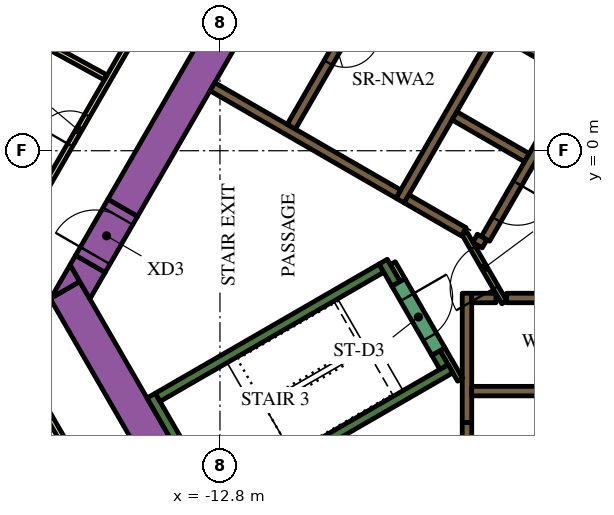
"""IFC4 building model, lengths in metres.
Left out: names, types, materials, properties, quantities, classifications, styles, units other than length and angle.
Written with IfcOpenShell. Run it as: python <this file> out.ifc"""

import sys

from ifc_helpers import new_model, si_unit, direction, frame, frame_2d, origin, place, context, subcontext, project, spatial, polyline, rectangle, outline, extrude, element, fill, save


model = new_model("IFC4")
c1 = context("Model", 3, precision=1e-05, world=origin(), true_north=direction((0.0, 1.0)))
c2 = subcontext(c1, "Body", "Model", "MODEL_VIEW")
j1 = project(units=[si_unit("LENGTHUNIT", "METRE"), si_unit("PLANEANGLEUNIT", "RADIAN")], contexts=[c1])
p1 = place(None, origin())
s1 = spatial("IfcSite", under=j1, at=p1, CompositionType="ELEMENT")
p2 = place(p1, origin())
s2 = spatial("IfcBuilding", under=s1, at=p2, CompositionType="ELEMENT")
p3 = place(p2, frame((0.0, 0.0, 118.8)))
s3 = spatial("IfcBuildingStorey", under=s2, at=p3, CompositionType="ELEMENT", Elevation=118.8)
p4 = place(p3, frame((-15.36, -1.503, 0.0), z_axis=(0.0, 0.0, 1.0), x_axis=(0.50000389221, 0.866023156604, 0.0)))
e1 = element("IfcWall", 1, at=p4, inside=s3, PredefinedType="SOLIDWALL", context=c2, shape_type="SweptSolid", body=[
    extrude(rectangle(XDim=21.0, YDim=0.9, at=frame_2d((10.5, 0.0))), origin(), (0.0, 0.0, 1.0), 3.9),
])
p5 = place(p3, frame((-12.134, -11.883, 0.0), z_axis=(0.0, 0.0, 1.0), x_axis=(-0.500005339912, 0.866022320763, 0.0)))
e2 = element("IfcWall", 2, at=p5, inside=s3, PredefinedType="SOLIDWALL", context=c2, shape_type="SweptSolid", body=[
    extrude(rectangle(XDim=9.488, YDim=0.9, at=frame_2d((4.744, 0.0))), origin(), (0.0, 0.0, 1.0), 3.9),
])
p6 = place(p3, origin())
e3 = element("IfcWall", 3, at=p6, inside=s3, PredefinedType="SOLIDWALL", context=c2, shape_type="SweptSolid", body=[
    extrude(outline(polyline([(-16.489, -3.44), (-17.251, -3.88), (-16.743, -3.0), (-16.489, -3.44)])), origin(), (0.0, 0.0, 1.0), 3.9),
])
e4 = element("IfcWall", 4, at=p6, inside=s3, PredefinedType="SOLIDWALL", context=c2, shape_type="SweptSolid", body=[
    extrude(outline(polyline([(-15.82, -3.201), (-16.223, -3.9), (-16.743, -3.0), (-16.599, -2.751), (-15.82, -3.201)])), origin(), (0.0, 0.0, 1.0), 3.9),
])
p7 = place(p3, frame((-12.885, -9.431, 0.0), z_axis=(0.0, 0.0, 1.0), x_axis=(-0.500020560727, 0.866013532718, 0.0)))
e5 = element("IfcWall", 5, at=p7, inside=s3, PredefinedType="SOLIDWALL", context=c2, shape_type="SweptSolid", body=[
    extrude(rectangle(XDim=3.45, YDim=0.25, at=frame_2d((1.725, 0.0))), origin(), (0.0, 0.0, 1.0), 3.9),
])
p8 = place(p3, frame((-14.44, -6.49, 0.0), z_axis=(0.0, 0.0, 1.0), x_axis=(0.866022966069, 0.500004222222, 0.0)))
e6 = element("IfcWall", 6, at=p8, inside=s3, PredefinedType="SOLIDWALL", context=c2, shape_type="SweptSolid", body=[
    extrude(rectangle(XDim=6.8, YDim=0.25, at=frame_2d((3.4, 0.0))), origin(), (0.0, 0.0, 1.0), 3.9),
])
p9 = place(p3, frame((-8.168, -3.503, 0.0), z_axis=(0.0, 0.0, 1.0), x_axis=(-0.499952099219, 0.866053057547, 0.0)))
e7 = element("IfcWall", 7, at=p9, inside=s3, PredefinedType="SOLIDWALL", context=c2, shape_type="SweptSolid", body=[
    extrude(rectangle(XDim=0.675, YDim=0.25, at=frame_2d((0.337, 0.0))), origin(), (0.0, 0.0, 1.0), 3.9),
])
p10 = place(p3, frame((-12.84, -9.261, 0.0), z_axis=(0.0, 0.0, 1.0), x_axis=(0.866016039709, 0.500016218704, 0.0)))
e8 = element("IfcWall", 8, at=p10, inside=s3, PredefinedType="SOLIDWALL", context=c2, shape_type="SweptSolid", body=[
    extrude(rectangle(XDim=7.05, YDim=0.25, at=frame_2d((3.525, 0.0))), origin(), (0.0, 0.0, 1.0), 3.9),
])
p11 = place(p3, frame((-6.905, -5.69, 0.0), z_axis=(0.0, 0.0, 1.0), x_axis=(-0.500402024738, 0.865793170242, 0.0)))
e9 = element("IfcWall", 9, at=p11, inside=s3, PredefinedType="SOLIDWALL", context=c2, shape_type="SweptSolid", body=[
    extrude(rectangle(XDim=0.425, YDim=0.25, at=frame_2d((0.212, 0.0))), origin(), (0.0, 0.0, 1.0), 3.9),
])
p12 = place(p3, frame((-5.259, -3.875, 0.0), z_axis=(0.0, 0.0, 1.0), x_axis=(1.0, 0.0, 0.0)))
e10 = element("IfcWall", 10, at=p12, inside=s3, PredefinedType="SOLIDWALL", context=c2, shape_type="SweptSolid", body=[
    extrude(rectangle(XDim=10.489, YDim=0.25, at=frame_2d((5.244, 0.0))), origin(), (0.0, 0.0, 1.0), 3.9),
])
p13 = place(p3, frame((-6.3, -3.75, 0.0), z_axis=(0.0, 0.0, 1.0), x_axis=(0.0, -1.0, 0.0)))
e11 = element("IfcWall", 11, at=p13, inside=s3, PredefinedType="SOLIDWALL", context=c2, shape_type="SweptSolid", body=[
    extrude(rectangle(XDim=3.404, YDim=0.25, at=frame_2d((1.702, 0.0))), origin(), (0.0, 0.0, 1.0), 3.9),
])
p14 = place(p3, frame((-6.175, -3.875, 0.0), z_axis=(0.0, 0.0, 1.0), x_axis=(1.0, 0.0, 0.0)))
e12 = element("IfcWall", 12, at=p14, inside=s3, PredefinedType="SOLIDWALL", context=c2, shape_type="SweptSolid", body=[
    extrude(rectangle(XDim=0.637, YDim=0.25, at=frame_2d((0.318, 0.0))), origin(), (0.0, 0.0, 1.0), 3.9),
])
p15 = place(p3, frame((-8.06, -1.311, 0.0), z_axis=(0.0, 0.0, 1.0), x_axis=(0.50000273126, 0.866023826885, 0.0)))
e13 = element("IfcWall", 13, at=p15, inside=s3, PredefinedType="SOLIDWALL", context=c2, shape_type="SweptSolid", body=[
    extrude(rectangle(XDim=10.33, YDim=0.25, at=frame_2d((5.165, 0.0))), origin(), (0.0, 0.0, 1.0), 3.9),
])
for number, where, z_axis, x_axis in (
    (14, (-5.369, 3.1, 0.0), (0.0, 0.0, 1.0), (0.866, -0.5, 0.0)),
    (15, (-4.724, -0.182, 0.0), (0.0, 0.0, 1.0), (-0.866, 0.5, 0.0)),
):
    element("IfcWall", number, at=place(p3, frame(where, z_axis=z_axis, x_axis=x_axis)), inside=s3, PredefinedType="SOLIDWALL", context=c2, shape_type="SweptSolid", body=[
        extrude(rectangle(XDim=2.2, YDim=0.25, at=frame_2d((1.1, 0.0))), origin(), (0.0, 0.0, 1.0), 3.9),
    ])
p16 = place(p3, frame((-6.088, -2.305, 0.0), z_axis=(0.0, 0.0, 1.0), x_axis=(0.866059450854, -0.499941024108, 0.0)))
e16 = element("IfcWall", 16, at=p16, inside=s3, PredefinedType="SOLIDWALL", context=c2, shape_type="SweptSolid", body=[
    extrude(rectangle(XDim=0.29, YDim=0.25, at=frame_2d((0.145, 0.0))), origin(), (0.0, 0.0, 1.0), 3.9),
])
p17 = place(p3, frame((-7.889, -1.265, 0.0), z_axis=(0.0, 0.0, 1.0), x_axis=(0.865986741702, -0.500066958712, 0.0)))
e17 = element("IfcWall", 17, at=p17, inside=s3, PredefinedType="SOLIDWALL", context=c2, shape_type="SweptSolid", body=[
    extrude(rectangle(XDim=1.738, YDim=0.25, at=frame_2d((0.869, 0.0))), origin(), (0.0, 0.0, 1.0), 3.9),
])
p18 = place(p3, frame((-8.106, -1.14, 0.0), z_axis=(0.0, 0.0, 1.0), x_axis=(-0.866000643155, 0.500042884217, 0.0)))
e18 = element("IfcWall", 18, at=p18, inside=s3, PredefinedType="SOLIDWALL", context=c2, shape_type="SweptSolid", body=[
    extrude(rectangle(XDim=5.65, YDim=0.25, at=frame_2d((2.825, 0.0))), origin(), (0.0, 0.0, 1.0), 3.9),
])
p19 = place(p3, frame((-6.48, -6.027, 0.0), z_axis=(0.0, 0.0, 1.0), x_axis=(-0.499927229454, 0.866067413802, 0.0)))
e19 = element("IfcWall", 19, at=p19, inside=s3, PredefinedType="PARTITIONING", context=c2, shape_type="SweptSolid", body=[
    extrude(rectangle(XDim=0.929, YDim=0.15, at=frame_2d((0.464, 0.0))), origin(), (0.0, 0.0, 1.0), 3.9),
])
p20 = place(p3, frame((-8.252, -2.958, 0.0), z_axis=(0.0, 0.0, 1.0), x_axis=(0.500174715838, -0.865924508047, 0.0)))
e20 = element("IfcWall", 20, at=p20, inside=s3, PredefinedType="PARTITIONING", context=c2, shape_type="SweptSolid", body=[
    extrude(rectangle(XDim=0.514, YDim=0.15, at=frame_2d((0.257, 0.0))), origin(), (0.0, 0.0, 1.0), 2.75),
])
p21 = place(p3, frame((-6.175, -6.325, 0.0), z_axis=(0.0, 0.0, 1.0), x_axis=(1.0, 0.0, 0.0)))
e21 = element("IfcWall", 21, at=p21, inside=s3, PredefinedType="SOLIDWALL", context=c2, shape_type="SweptSolid", body=[
    extrude(rectangle(XDim=12.35, YDim=0.25, at=frame_2d((6.175, 0.0))), origin(), (0.0, 0.0, 1.0), 3.9),
])
p22 = place(p21, frame((3.205, 0.0, 0.0)))
e22 = element("IfcOpeningElement", 22, at=p22, cuts=e21, PredefinedType="OPENING", context=c2, shape_type="SweptSolid", body=[
    extrude(rectangle(XDim=0.9, YDim=2.1, at=frame_2d((0.45, 1.05))), frame((0.0, 0.135, 0.0), z_axis=(0.0, -1.0, 0.0), x_axis=(1.0, 0.0, 0.0)), (0.0, 0.0, 1.0), 0.27),
])
p23 = place(p21, frame((8.145, 0.0, 0.0)))
e23 = element("IfcOpeningElement", 23, at=p23, cuts=e21, PredefinedType="OPENING", context=c2, shape_type="SweptSolid", body=[
    extrude(rectangle(XDim=1.1, YDim=2.1, at=frame_2d((0.55, 1.05))), frame((0.0, 0.135, 0.0), z_axis=(0.0, -1.0, 0.0), x_axis=(1.0, 0.0, 0.0)), (0.0, 0.0, 1.0), 0.27),
])
p24 = place(p21, frame((10.665, 0.0, 0.0)))
e24 = element("IfcOpeningElement", 24, at=p24, cuts=e21, PredefinedType="OPENING", context=c2, shape_type="SweptSolid", body=[
    extrude(rectangle(XDim=1.1, YDim=2.1, at=frame_2d((0.55, 1.05))), frame((0.0, 0.135, 0.0), z_axis=(0.0, -1.0, 0.0), x_axis=(1.0, 0.0, 0.0)), (0.0, 0.0, 1.0), 0.27),
])
p25 = place(p3, frame((-6.008, 9.144, 0.0), z_axis=(0.0, 0.0, 1.0), x_axis=(-0.500006956611, -0.866021387346, 0.0)))
e25 = element("IfcWall", 25, at=p25, inside=s3, PredefinedType="SOLIDWALL", context=c2, shape_type="SweptSolid", body=[
    extrude(rectangle(XDim=9.83, YDim=0.25, at=frame_2d((4.915, 0.0))), origin(), (0.0, 0.0, 1.0), 3.9),
])
p26 = place(p25, frame((6.985, 0.0, 0.0)))
e26 = element("IfcOpeningElement", 26, at=p26, cuts=e25, PredefinedType="OPENING", context=c2, shape_type="SweptSolid", body=[
    extrude(rectangle(XDim=0.9, YDim=2.1, at=frame_2d((0.45, 1.05))), frame((0.0, 0.135, 0.0), z_axis=(0.0, -1.0, 0.0), x_axis=(1.0, 0.0, 0.0)), (0.0, 0.0, 1.0), 0.27),
])
p27 = place(p3, frame((-0.898, 6.194, 0.0), z_axis=(0.0, 0.0, 1.0), x_axis=(-0.499996202215, -0.866027596426, 0.0)))
e27 = element("IfcWall", 27, at=p27, inside=s3, PredefinedType="SOLIDWALL", context=c2, shape_type="SweptSolid", body=[
    extrude(rectangle(XDim=9.83, YDim=0.25, at=frame_2d((4.915, 0.0))), origin(), (0.0, 0.0, 1.0), 3.9),
])
p28 = place(p27, frame((0.585, 0.0, 0.0)))
e28 = element("IfcOpeningElement", 28, at=p28, cuts=e27, PredefinedType="OPENING", context=c2, shape_type="SweptSolid", body=[
    extrude(rectangle(XDim=1.1, YDim=2.1, at=frame_2d((0.55, 1.05))), frame((0.0, 0.135, 0.0), z_axis=(0.0, -1.0, 0.0), x_axis=(1.0, 0.0, 0.0)), (0.0, 0.0, 1.0), 0.27),
])
p29 = place(p27, frame((3.105, 0.0, 0.0)))
e29 = element("IfcOpeningElement", 29, at=p29, cuts=e27, PredefinedType="OPENING", context=c2, shape_type="SweptSolid", body=[
    extrude(rectangle(XDim=1.1, YDim=2.1, at=frame_2d((0.55, 1.05))), frame((0.0, 0.135, 0.0), z_axis=(0.0, -1.0, 0.0), x_axis=(1.0, 0.0, 0.0)), (0.0, 0.0, 1.0), 0.27),
])
p30 = place(p27, frame((5.625, 0.0, 0.0)))
e30 = element("IfcOpeningElement", 30, at=p30, cuts=e27, PredefinedType="OPENING", context=c2, shape_type="SweptSolid", body=[
    extrude(rectangle(XDim=1.1, YDim=2.1, at=frame_2d((0.55, 1.05))), frame((0.0, 0.135, 0.0), z_axis=(0.0, -1.0, 0.0), x_axis=(1.0, 0.0, 0.0)), (0.0, 0.0, 1.0), 0.27),
])
p31 = place(p27, frame((8.145, 0.0, 0.0)))
e31 = element("IfcOpeningElement", 31, at=p31, cuts=e27, PredefinedType="OPENING", context=c2, shape_type="SweptSolid", body=[
    extrude(rectangle(XDim=1.1, YDim=2.1, at=frame_2d((0.55, 1.05))), frame((0.0, 0.135, 0.0), z_axis=(0.0, -1.0, 0.0), x_axis=(1.0, 0.0, 0.0)), (0.0, 0.0, 1.0), 0.27),
])
p32 = place(p3, frame((-8.103, -3.466, 0.0), z_axis=(0.0, 0.0, 1.0), x_axis=(0.500078061341, -0.865980330357, 0.0)))
e32 = element("IfcWall", 32, at=p32, inside=s3, PredefinedType="SOLIDWALL", context=c2, shape_type="SweptSolid", body=[
    extrude(rectangle(XDim=2.1, YDim=0.4, at=frame_2d((1.05, 0.0))), origin(), (0.0, 0.0, 1.0), 3.9),
])
p33 = place(p32, frame((0.45, 0.0, 0.0)))
e33 = element("IfcOpeningElement", 33, at=p33, cuts=e32, PredefinedType="OPENING", context=c2, shape_type="SweptSolid", body=[
    extrude(rectangle(XDim=1.2, YDim=2.1, at=frame_2d((0.6, 1.05))), frame((0.0, 0.21, 0.0), z_axis=(0.0, -1.0, 0.0), x_axis=(1.0, 0.0, 0.0)), (0.0, 0.0, 1.0), 0.42),
])
p34 = place(p3, frame((-6.3, -7.154, 0.0), z_axis=(0.0, 0.0, 1.0), x_axis=(0.0, -1.0, 0.0)))
e34 = element("IfcWall", 34, at=p34, inside=s3, PredefinedType="SOLIDWALL", context=c2, shape_type="SweptSolid", body=[
    extrude(rectangle(XDim=1.8, YDim=0.25, at=frame_2d((0.9, 0.0))), origin(), (0.0, 0.0, 1.0), 3.9),
])
p35 = place(p34, frame((0.45, 0.0, 0.0)))
e35 = element("IfcOpeningElement", 35, at=p35, cuts=e34, PredefinedType="OPENING", context=c2, shape_type="SweptSolid", body=[
    extrude(rectangle(XDim=0.9, YDim=2.1, at=frame_2d((0.45, 1.05))), frame((0.0, 0.135, 0.0), z_axis=(0.0, -1.0, 0.0), x_axis=(1.0, 0.0, 0.0)), (0.0, 0.0, 1.0), 0.27),
])
p36 = place(p3, frame((-5.317, -3.99, 0.0), z_axis=(0.0, 0.0, 1.0), x_axis=(-0.500027713859, 0.866009402589, 0.0)))
e36 = element("IfcWall", 36, at=p36, inside=s3, PredefinedType="PARTITIONING", context=c2, shape_type="SweptSolid", body=[
    extrude(rectangle(XDim=2.1, YDim=0.15, at=frame_2d((1.05, 0.0))), origin(), (0.0, 0.0, 1.0), 3.9),
])
p37 = place(p36, frame((0.45, 0.0, 0.0)))
e37 = element("IfcOpeningElement", 37, at=p37, cuts=e36, PredefinedType="OPENING", context=c2, shape_type="SweptSolid", body=[
    extrude(rectangle(XDim=1.2, YDim=2.1, at=frame_2d((0.6, 1.05))), frame((0.0, 0.085, 0.0), z_axis=(0.0, -1.0, 0.0), x_axis=(1.0, 0.0, 0.0)), (0.0, 0.0, 1.0), 0.17),
])
p38 = place(p3, frame((-16.209, -2.976, 0.0), z_axis=(0.0, 0.0, 1.0), x_axis=(0.499954529098, 0.86605165483, 0.0)))
e38 = element("IfcWall", 38, at=p38, inside=s3, PredefinedType="SOLIDWALL", context=c2, shape_type="SweptSolid", body=[
    extrude(rectangle(XDim=1.7, YDim=0.9, at=frame_2d((0.85, 0.0))), origin(), (0.0, 0.0, 1.0), 3.9),
])
p39 = place(p38, frame((0.25, 0.0, 0.0)))
e39 = element("IfcOpeningElement", 39, at=p39, cuts=e38, PredefinedType="OPENING", context=c2, shape_type="SweptSolid", body=[
    extrude(rectangle(XDim=1.2, YDim=2.1, at=frame_2d((0.6, 1.05))), frame((0.0, 0.46, 0.0), z_axis=(0.0, -1.0, 0.0), x_axis=(1.0, 0.0, 0.0)), (0.0, 0.0, 1.0), 0.92),
])
p40 = place(p3, frame((-19.081, -3.9, 0.0), z_axis=(0.0, 0.0, 1.0), x_axis=(0.499998313975, 0.866026377209, 0.0)))
e40 = element("IfcWall", 40, at=p40, inside=s3, PredefinedType="PARTITIONING", context=c2, shape_type="SweptSolid", body=[
    extrude(rectangle(XDim=25.766, YDim=0.15, at=frame_2d((12.883, 0.0))), origin(), (0.0, 0.0, 1.0), 2.75),
])
p41 = place(p40, frame((19.306, 0.0, 0.0)))
e41 = element("IfcOpeningElement", 41, at=p41, cuts=e40, PredefinedType="OPENING", context=c2, shape_type="SweptSolid", body=[
    extrude(rectangle(XDim=1.0, YDim=2.1, at=frame_2d((0.5, 1.05))), frame((0.0, 0.085, 0.0), z_axis=(0.0, -1.0, 0.0), x_axis=(1.0, 0.0, 0.0)), (0.0, 0.0, 1.0), 0.17),
])
p42 = place(p40, frame((18.0, 0.0, 0.0)))
e42 = element("IfcOpeningElement", 42, at=p42, cuts=e40, PredefinedType="OPENING", context=c2, shape_type="SweptSolid", body=[
    extrude(rectangle(XDim=1.0, YDim=2.1, at=frame_2d((0.5, 1.05))), frame((0.0, 0.085, 0.0), z_axis=(0.0, -1.0, 0.0), x_axis=(1.0, 0.0, 0.0)), (0.0, 0.0, 1.0), 0.17),
])
p43 = place(p40, frame((7.793, 0.0, 0.0)))
e43 = element("IfcOpeningElement", 43, at=p43, cuts=e40, PredefinedType="OPENING", context=c2, shape_type="SweptSolid", body=[
    extrude(rectangle(XDim=0.9, YDim=2.1, at=frame_2d((0.45, 1.05))), frame((0.0, 0.085, 0.0), z_axis=(0.0, -1.0, 0.0), x_axis=(1.0, 0.0, 0.0)), (0.0, 0.0, 1.0), 0.17),
])
p44 = place(p40, frame((4.674, 0.0, 0.0)))
e44 = element("IfcOpeningElement", 44, at=p44, cuts=e40, PredefinedType="OPENING", context=c2, shape_type="SweptSolid", body=[
    extrude(rectangle(XDim=0.9, YDim=2.1, at=frame_2d((0.45, 1.05))), frame((0.0, 0.085, 0.0), z_axis=(0.0, -1.0, 0.0), x_axis=(1.0, 0.0, 0.0)), (0.0, 0.0, 1.0), 0.17),
])
p45 = place(p40, frame((0.18, 0.0, 0.0)))
e45 = element("IfcOpeningElement", 45, at=p45, cuts=e40, PredefinedType="OPENING", context=c2, shape_type="SweptSolid", body=[
    extrude(rectangle(XDim=1.0, YDim=2.1, at=frame_2d((0.5, 1.05))), frame((0.0, 0.085, 0.0), z_axis=(0.0, -1.0, 0.0), x_axis=(1.0, 0.0, 0.0)), (0.0, 0.0, 1.0), 0.17),
])
p46 = place(p3, frame((-16.412, -8.523, 0.0), z_axis=(0.0, 0.0, 1.0), x_axis=(-0.500001929737, 0.866024289647, 0.0)))
e46 = element("IfcWall", 46, at=p46, inside=s3, PredefinedType="PARTITIONING", context=c2, shape_type="SweptSolid", body=[
    extrude(rectangle(XDim=5.268, YDim=0.15, at=frame_2d((2.634, 0.0))), origin(), (0.0, 0.0, 1.0), 2.75),
])
p47 = place(p3, frame((-26.591, -3.122, 0.0), z_axis=(0.0, 0.0, 1.0), x_axis=(0.893766213273, -0.448533115847, 0.0)))
e47 = element("IfcWall", 47, at=p47, inside=s3, PredefinedType="PARTITIONING", context=c2, shape_type="SweptSolid", body=[
    extrude(rectangle(XDim=10.875, YDim=0.15, at=frame_2d((5.438, 0.0))), origin(), (0.0, 0.0, 1.0), 2.75),
])
p48 = place(p3, frame((-21.614, 5.102, 0.0), z_axis=(0.0, 0.0, 1.0), x_axis=(0.877484555087, -0.479604895287, 0.0)))
e48 = element("IfcWall", 48, at=p48, inside=s3, PredefinedType="PARTITIONING", context=c2, shape_type="SweptSolid", body=[
    extrude(rectangle(XDim=6.611, YDim=0.15, at=frame_2d((3.306, 0.0))), origin(), (0.0, 0.0, 1.0), 2.75),
])
p49 = place(p26, origin())
e49 = element("IfcDoor", 49, at=p49, inside=s3, OperationType="SINGLE_SWING_LEFT", PredefinedType="DOOR", context=c2, shape_type="SweptSolid", body=[
    extrude(rectangle(XDim=0.9, YDim=2.1, at=frame_2d((0.45, 1.05))), frame((0.0, 0.025, 0.0), z_axis=(0.0, -1.0, 0.0), x_axis=(1.0, 0.0, 0.0)), (0.0, 0.0, 1.0), 0.05),
])
fill(e26, e49)
p50 = place(p31, origin())
e50 = element("IfcDoor", 50, at=p50, inside=s3, OperationType="DOUBLE_DOOR_SLIDING", PredefinedType="DOOR", context=c2, shape_type="SweptSolid", body=[
    extrude(rectangle(XDim=1.1, YDim=2.1, at=frame_2d((0.55, 1.05))), frame((0.0, 0.025, 0.0), z_axis=(0.0, -1.0, 0.0), x_axis=(1.0, 0.0, 0.0)), (0.0, 0.0, 1.0), 0.05),
])
fill(e31, e50)
p51 = place(p33, origin())
e51 = element("IfcDoor", 51, at=p51, inside=s3, OperationType="SINGLE_SWING_LEFT", PredefinedType="DOOR", context=c2, shape_type="SweptSolid", body=[
    extrude(rectangle(XDim=1.2, YDim=2.1, at=frame_2d((0.6, 1.05))), frame((0.0, 0.025, 0.0), z_axis=(0.0, -1.0, 0.0), x_axis=(1.0, 0.0, 0.0)), (0.0, 0.0, 1.0), 0.05),
])
fill(e33, e51)
p52 = place(p37, origin())
e52 = element("IfcDoor", 52, at=p52, inside=s3, OperationType="SINGLE_SWING_LEFT", PredefinedType="DOOR", context=c2, shape_type="SweptSolid", body=[
    extrude(rectangle(XDim=1.2, YDim=2.1, at=frame_2d((0.6, 1.05))), frame((0.0, 0.025, 0.0), z_axis=(0.0, -1.0, 0.0), x_axis=(1.0, 0.0, 0.0)), (0.0, 0.0, 1.0), 0.05),
])
fill(e37, e52)
p53 = place(p39, origin())
e53 = element("IfcDoor", 53, at=p53, inside=s3, OperationType="SINGLE_SWING_LEFT", PredefinedType="DOOR", context=c2, shape_type="SweptSolid", body=[
    extrude(rectangle(XDim=1.2, YDim=2.1, at=frame_2d((0.6, 1.05))), frame((0.0, 0.025, 0.0), z_axis=(0.0, -1.0, 0.0), x_axis=(1.0, 0.0, 0.0)), (0.0, 0.0, 1.0), 0.05),
])
fill(e39, e53)
p54 = place(p44, origin())
e54 = element("IfcDoor", 54, at=p54, inside=s3, OperationType="SINGLE_SWING_LEFT", PredefinedType="DOOR", context=c2, shape_type="SweptSolid", body=[
    extrude(rectangle(XDim=0.9, YDim=2.1, at=frame_2d((0.45, 1.05))), frame((0.0, 0.025, 0.0), z_axis=(0.0, -1.0, 0.0), x_axis=(1.0, 0.0, 0.0)), (0.0, 0.0, 1.0), 0.05),
])
fill(e44, e54)
save(model, sys.argv[1])
